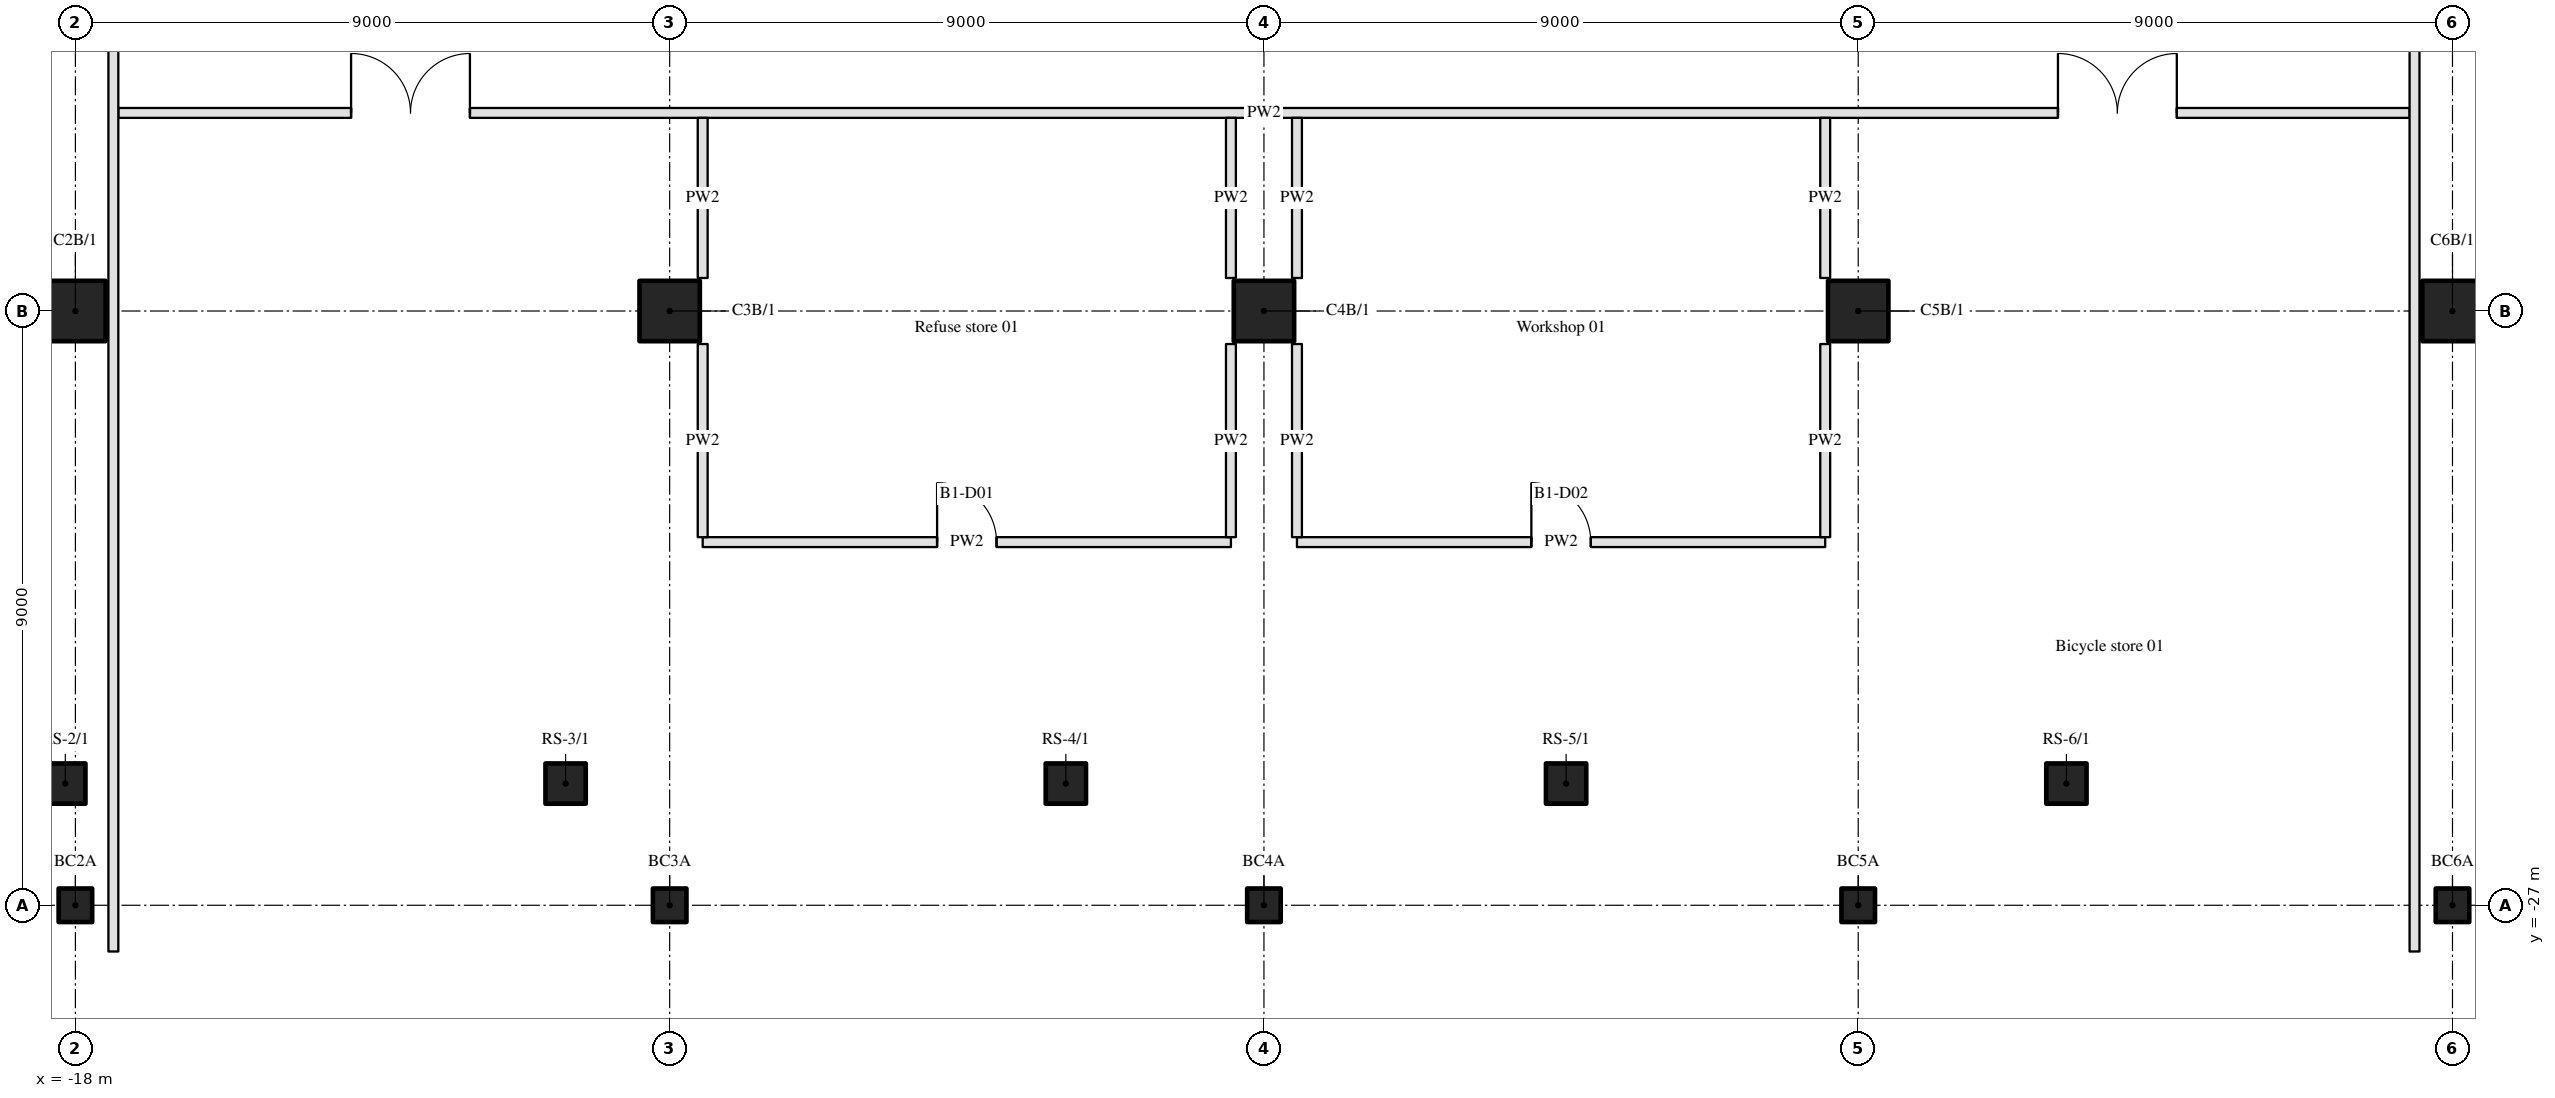
"""IFC4 building model, lengths in metres.
Left out: names, types, materials, properties, quantities, classifications, styles, units other than length and angle.
Written with IfcOpenShell. Run it as: python <this file> out.ifc"""

import sys

from ifc_helpers import new_model, si_unit, direction, frame, frame_2d, origin, origin_2d, place, context, subcontext, project, spatial, rectangle, hollow_circle, extrude, element, fill, save


model = new_model("IFC4")
c1 = context("Model", 3, precision=1e-05, world=origin(), true_north=direction((0.0, 1.0)))
c2 = subcontext(c1, "Body", "Model", "MODEL_VIEW")
j1 = project(units=[si_unit("LENGTHUNIT", "METRE"), si_unit("PLANEANGLEUNIT", "RADIAN")], contexts=[c1])
p1 = place(None, origin())
s1 = spatial("IfcSite", under=j1, at=p1, CompositionType="ELEMENT")
p2 = place(p1, origin())
s2 = spatial("IfcBuilding", under=s1, at=p2, CompositionType="ELEMENT")
p3 = place(p2, frame((0.0, 0.0, -5.0)))
s3 = spatial("IfcBuildingStorey", under=s2, at=p3, CompositionType="ELEMENT", Elevation=-5.0)
for number, where, z_axis, x_axis in (
    (1, (-18.0, -18.0, -0.25), (0.0, 0.0, 1.0), (1.0, 0.0, 0.0)),
    (2, (-9.0, -18.0, -0.25), (0.0, 0.0, 1.0), (1.0, 0.0, 0.0)),
    (3, (0.0, -18.0, -0.25), (0.0, 0.0, 1.0), (1.0, 0.0, 0.0)),
    (4, (9.0, -18.0, -0.25), (0.0, 0.0, 1.0), (1.0, 0.0, 0.0)),
    (5, (18.0, -18.0, -0.25), (0.0, 0.0, 1.0), (1.0, 0.0, 0.0)),
):
    element("IfcColumn", number, at=place(p3, frame(where, z_axis=z_axis, x_axis=x_axis)), inside=s3, PredefinedType="COLUMN", context=c2, shape_type="SweptSolid", body=[
        extrude(hollow_circle(Radius=0.457, WallThickness=0.05, at=origin_2d()), origin(), (0.0, 0.0, 1.0), 5.25),
    ])
for number, where, z_axis, x_axis in (
    (6, (-18.153, -25.157, -0.25), (0.0, 0.0, 1.0), (1.0, 0.0, 0.0)),
    (7, (-10.576, -25.157, -0.25), (0.0, 0.0, 1.0), (1.0, 0.0, 0.0)),
    (8, (-3.0, -25.157, -0.25), (0.0, 0.0, 1.0), (1.0, 0.0, 0.0)),
    (9, (4.576, -25.157, -0.25), (0.0, 0.0, 1.0), (1.0, 0.0, 0.0)),
    (10, (12.153, -25.157, -0.25), (0.0, 0.0, 1.0), (1.0, 0.0, 0.0)),
):
    element("IfcColumn", number, at=place(p3, frame(where, z_axis=z_axis, x_axis=x_axis)), inside=s3, PredefinedType="COLUMN", context=c2, shape_type="SweptSolid", body=[
        extrude(hollow_circle(Radius=0.305, WallThickness=0.03, at=origin_2d()), origin(), (0.0, 0.0, 1.0), 5.25),
    ])
for number, where, z_axis, x_axis in (
    (11, (-18.0, -27.0, -0.25), (0.0, 0.0, 1.0), (1.0, 0.0, 0.0)),
    (12, (-9.0, -27.0, -0.25), (0.0, 0.0, 1.0), (1.0, 0.0, 0.0)),
    (13, (0.0, -27.0, -0.25), (0.0, 0.0, 1.0), (1.0, 0.0, 0.0)),
    (14, (9.0, -27.0, -0.25), (0.0, 0.0, 1.0), (1.0, 0.0, 0.0)),
    (15, (18.0, -27.0, -0.25), (0.0, 0.0, 1.0), (1.0, 0.0, 0.0)),
):
    element("IfcColumn", number, at=place(p3, frame(where, z_axis=z_axis, x_axis=x_axis)), inside=s3, PredefinedType="COLUMN", context=c2, shape_type="SweptSolid", body=[
        extrude(hollow_circle(Radius=0.254, WallThickness=0.03, at=origin_2d()), origin(), (0.0, 0.0, 1.0), 4.8),
    ])
p4 = place(p3, frame((-8.5, -21.5, 0.0), z_axis=(0.0, 0.0, 1.0), x_axis=(1.0, 0.0, 0.0)))
e16 = element("IfcWall", 16, at=p4, inside=s3, PredefinedType="PARTITIONING", context=c2, shape_type="SweptSolid", body=[
    extrude(rectangle(XDim=8.0, YDim=0.15, at=frame_2d((4.0, 0.0))), origin(), (0.0, 0.0, 1.0), 4.06),
])
p5 = place(p4, frame((3.55, 0.0, 0.0)))
e17 = element("IfcOpeningElement", 17, at=p5, cuts=e16, PredefinedType="OPENING", context=c2, shape_type="SweptSolid", body=[
    extrude(rectangle(XDim=0.9, YDim=2.1, at=frame_2d((0.45, 1.05))), frame((0.0, 0.085, 0.0), z_axis=(0.0, -1.0, 0.0), x_axis=(1.0, 0.0, 0.0)), (0.0, 0.0, 1.0), 0.17),
])
p6 = place(p3, frame((0.5, -21.5, 0.0), z_axis=(0.0, 0.0, 1.0), x_axis=(1.0, 0.0, 0.0)))
e18 = element("IfcWall", 18, at=p6, inside=s3, PredefinedType="PARTITIONING", context=c2, shape_type="SweptSolid", body=[
    extrude(rectangle(XDim=8.0, YDim=0.15, at=frame_2d((4.0, 0.0))), origin(), (0.0, 0.0, 1.0), 4.06),
])
p7 = place(p6, frame((3.55, 0.0, 0.0)))
e19 = element("IfcOpeningElement", 19, at=p7, cuts=e18, PredefinedType="OPENING", context=c2, shape_type="SweptSolid", body=[
    extrude(rectangle(XDim=0.9, YDim=2.1, at=frame_2d((0.45, 1.05))), frame((0.0, 0.085, 0.0), z_axis=(0.0, -1.0, 0.0), x_axis=(1.0, 0.0, 0.0)), (0.0, 0.0, 1.0), 0.17),
])
p8 = place(p3, frame((-17.35, -15.0, 0.0), z_axis=(0.0, 0.0, 1.0), x_axis=(1.0, 0.0, 0.0)))
e20 = element("IfcWall", 20, at=p8, inside=s3, PredefinedType="PARTITIONING", context=c2, shape_type="SweptSolid", body=[
    extrude(rectangle(XDim=34.7, YDim=0.15, at=frame_2d((17.35, 0.0))), origin(), (0.0, 0.0, 1.0), 4.06),
])
p9 = place(p8, frame((3.525, 0.0, 0.0)))
e21 = element("IfcOpeningElement", 21, at=p9, cuts=e20, PredefinedType="OPENING", context=c2, shape_type="SweptSolid", body=[
    extrude(rectangle(XDim=1.8, YDim=2.1, at=frame_2d((0.9, 1.05))), frame((0.0, 0.085, 0.0), z_axis=(0.0, -1.0, 0.0), x_axis=(1.0, 0.0, 0.0)), (0.0, 0.0, 1.0), 0.17),
])
p10 = place(p8, frame((29.375, 0.0, 0.0)))
e22 = element("IfcOpeningElement", 22, at=p10, cuts=e20, PredefinedType="OPENING", context=c2, shape_type="SweptSolid", body=[
    extrude(rectangle(XDim=1.8, YDim=2.1, at=frame_2d((0.9, 1.05))), frame((0.0, 0.085, 0.0), z_axis=(0.0, -1.0, 0.0), x_axis=(1.0, 0.0, 0.0)), (0.0, 0.0, 1.0), 0.17),
])
p11 = place(p3, frame((-17.425, 27.7, 0.0), z_axis=(0.0, 0.0, 1.0), x_axis=(0.0, -1.0, 0.0)))
e23 = element("IfcWall", 23, at=p11, inside=s3, PredefinedType="PARTITIONING", context=c2, shape_type="SweptSolid", body=[
    extrude(rectangle(XDim=55.4, YDim=0.15, at=frame_2d((27.7, 0.0))), origin(), (0.0, 0.0, 1.0), 4.06),
])
p12 = place(p11, frame((38.8, 0.0, 0.0)))
e24 = element("IfcOpeningElement", 24, at=p12, cuts=e23, PredefinedType="OPENING", context=c2, shape_type="SweptSolid", body=[
    extrude(rectangle(XDim=1.8, YDim=2.1, at=frame_2d((0.9, 1.05))), frame((0.0, 0.085, 0.0), z_axis=(0.0, -1.0, 0.0), x_axis=(1.0, 0.0, 0.0)), (0.0, 0.0, 1.0), 0.17),
])
p13 = place(p11, frame((28.3, 0.0, 0.0)))
e25 = element("IfcOpeningElement", 25, at=p13, cuts=e23, PredefinedType="OPENING", context=c2, shape_type="SweptSolid", body=[
    extrude(rectangle(XDim=1.8, YDim=2.1, at=frame_2d((0.9, 1.05))), frame((0.0, 0.085, 0.0), z_axis=(0.0, -1.0, 0.0), x_axis=(1.0, 0.0, 0.0)), (0.0, 0.0, 1.0), 0.17),
])
p14 = place(p11, frame((30.4, 0.0, 0.0)))
e26 = element("IfcOpeningElement", 26, at=p14, cuts=e23, PredefinedType="OPENING", context=c2, shape_type="SweptSolid", body=[
    extrude(rectangle(XDim=1.8, YDim=2.1, at=frame_2d((0.9, 1.05))), frame((0.0, 0.085, 0.0), z_axis=(0.0, -1.0, 0.0), x_axis=(1.0, 0.0, 0.0)), (0.0, 0.0, 1.0), 0.17),
])
p15 = place(p3, frame((-8.5, -21.425, 0.0), z_axis=(0.0, 0.0, 1.0), x_axis=(0.0, 1.0, 0.0)))
e27 = element("IfcWall", 27, at=p15, inside=s3, PredefinedType="PARTITIONING", context=c2, shape_type="SweptSolid", body=[
    extrude(rectangle(XDim=2.925, YDim=0.15, at=frame_2d((1.462, 0.0))), origin(), (0.0, 0.0, 1.0), 4.06),
])
p16 = place(p3, frame((-8.5, -17.5, 0.0), z_axis=(0.0, 0.0, 1.0), x_axis=(0.0, 1.0, 0.0)))
e28 = element("IfcWall", 28, at=p16, inside=s3, PredefinedType="PARTITIONING", context=c2, shape_type="SweptSolid", body=[
    extrude(rectangle(XDim=2.425, YDim=0.15, at=frame_2d((1.212, 0.0))), origin(), (0.0, 0.0, 1.0), 4.06),
])
p17 = place(p3, frame((-0.5, -21.425, 0.0), z_axis=(0.0, 0.0, 1.0), x_axis=(0.0, 1.0, 0.0)))
e29 = element("IfcWall", 29, at=p17, inside=s3, PredefinedType="PARTITIONING", context=c2, shape_type="SweptSolid", body=[
    extrude(rectangle(XDim=2.925, YDim=0.15, at=frame_2d((1.462, 0.0))), origin(), (0.0, 0.0, 1.0), 4.06),
])
p18 = place(p3, frame((-0.5, -17.5, 0.0), z_axis=(0.0, 0.0, 1.0), x_axis=(0.0, 1.0, 0.0)))
e30 = element("IfcWall", 30, at=p18, inside=s3, PredefinedType="PARTITIONING", context=c2, shape_type="SweptSolid", body=[
    extrude(rectangle(XDim=2.425, YDim=0.15, at=frame_2d((1.212, 0.0))), origin(), (0.0, 0.0, 1.0), 4.06),
])
p19 = place(p3, frame((0.5, -21.425, 0.0), z_axis=(0.0, 0.0, 1.0), x_axis=(0.0, 1.0, 0.0)))
e31 = element("IfcWall", 31, at=p19, inside=s3, PredefinedType="PARTITIONING", context=c2, shape_type="SweptSolid", body=[
    extrude(rectangle(XDim=2.925, YDim=0.15, at=frame_2d((1.462, 0.0))), origin(), (0.0, 0.0, 1.0), 4.06),
])
p20 = place(p3, frame((0.5, -17.5, 0.0), z_axis=(0.0, 0.0, 1.0), x_axis=(0.0, 1.0, 0.0)))
e32 = element("IfcWall", 32, at=p20, inside=s3, PredefinedType="PARTITIONING", context=c2, shape_type="SweptSolid", body=[
    extrude(rectangle(XDim=2.425, YDim=0.15, at=frame_2d((1.212, 0.0))), origin(), (0.0, 0.0, 1.0), 4.06),
])
p21 = place(p3, frame((8.5, -21.425, 0.0), z_axis=(0.0, 0.0, 1.0), x_axis=(0.0, 1.0, 0.0)))
e33 = element("IfcWall", 33, at=p21, inside=s3, PredefinedType="PARTITIONING", context=c2, shape_type="SweptSolid", body=[
    extrude(rectangle(XDim=2.925, YDim=0.15, at=frame_2d((1.462, 0.0))), origin(), (0.0, 0.0, 1.0), 4.06),
])
p22 = place(p3, frame((8.5, -17.5, 0.0), z_axis=(0.0, 0.0, 1.0), x_axis=(0.0, 1.0, 0.0)))
e34 = element("IfcWall", 34, at=p22, inside=s3, PredefinedType="PARTITIONING", context=c2, shape_type="SweptSolid", body=[
    extrude(rectangle(XDim=2.425, YDim=0.15, at=frame_2d((1.212, 0.0))), origin(), (0.0, 0.0, 1.0), 4.06),
])
p23 = place(p3, frame((17.425, -27.7, 0.0), z_axis=(0.0, 0.0, 1.0), x_axis=(0.0, 1.0, 0.0)))
e35 = element("IfcWall", 35, at=p23, inside=s3, PredefinedType="PARTITIONING", context=c2, shape_type="SweptSolid", body=[
    extrude(rectangle(XDim=55.4, YDim=0.15, at=frame_2d((27.7, 0.0))), origin(), (0.0, 0.0, 1.0), 4.06),
])
p24 = place(p23, frame((19.3, 0.0, 0.0)))
e36 = element("IfcOpeningElement", 36, at=p24, cuts=e35, PredefinedType="OPENING", context=c2, shape_type="SweptSolid", body=[
    extrude(rectangle(XDim=1.8, YDim=2.1, at=frame_2d((0.9, 1.05))), frame((0.0, 0.085, 0.0), z_axis=(0.0, -1.0, 0.0), x_axis=(1.0, 0.0, 0.0)), (0.0, 0.0, 1.0), 0.17),
])
p25 = place(p23, frame((21.4, 0.0, 0.0)))
e37 = element("IfcOpeningElement", 37, at=p25, cuts=e35, PredefinedType="OPENING", context=c2, shape_type="SweptSolid", body=[
    extrude(rectangle(XDim=1.8, YDim=2.1, at=frame_2d((0.9, 1.05))), frame((0.0, 0.085, 0.0), z_axis=(0.0, -1.0, 0.0), x_axis=(1.0, 0.0, 0.0)), (0.0, 0.0, 1.0), 0.17),
])
p26 = place(p23, frame((29.8, 0.0, 0.0)))
e38 = element("IfcOpeningElement", 38, at=p26, cuts=e35, PredefinedType="OPENING", context=c2, shape_type="SweptSolid", body=[
    extrude(rectangle(XDim=1.8, YDim=2.1, at=frame_2d((0.9, 1.05))), frame((0.0, 0.085, 0.0), z_axis=(0.0, -1.0, 0.0), x_axis=(1.0, 0.0, 0.0)), (0.0, 0.0, 1.0), 0.17),
])
p27 = place(p9, origin())
e39 = element("IfcDoor", 39, at=p27, inside=s3, OperationType="DOUBLE_DOOR_SINGLE_SWING", PredefinedType="DOOR", context=c2, shape_type="SweptSolid", body=[
    extrude(rectangle(XDim=1.8, YDim=2.1, at=frame_2d((0.9, 1.05))), frame((0.0, 0.025, 0.0), z_axis=(0.0, -1.0, 0.0), x_axis=(1.0, 0.0, 0.0)), (0.0, 0.0, 1.0), 0.05),
])
fill(e21, e39)
p28 = place(p10, origin())
e40 = element("IfcDoor", 40, at=p28, inside=s3, OperationType="DOUBLE_DOOR_SINGLE_SWING", PredefinedType="DOOR", context=c2, shape_type="SweptSolid", body=[
    extrude(rectangle(XDim=1.8, YDim=2.1, at=frame_2d((0.9, 1.05))), frame((0.0, 0.025, 0.0), z_axis=(0.0, -1.0, 0.0), x_axis=(1.0, 0.0, 0.0)), (0.0, 0.0, 1.0), 0.05),
])
fill(e22, e40)
p29 = place(p7, origin())
e41 = element("IfcDoor", 41, at=p29, inside=s3, OperationType="SINGLE_SWING_LEFT", PredefinedType="DOOR", context=c2, shape_type="SweptSolid", body=[
    extrude(rectangle(XDim=0.9, YDim=2.1, at=frame_2d((0.45, 1.05))), frame((0.0, 0.025, 0.0), z_axis=(0.0, -1.0, 0.0), x_axis=(1.0, 0.0, 0.0)), (0.0, 0.0, 1.0), 0.05),
])
fill(e19, e41)
p30 = place(p5, origin())
e42 = element("IfcDoor", 42, at=p30, inside=s3, OperationType="SINGLE_SWING_LEFT", PredefinedType="DOOR", context=c2, shape_type="SweptSolid", body=[
    extrude(rectangle(XDim=0.9, YDim=2.1, at=frame_2d((0.45, 1.05))), frame((0.0, 0.025, 0.0), z_axis=(0.0, -1.0, 0.0), x_axis=(1.0, 0.0, 0.0)), (0.0, 0.0, 1.0), 0.05),
])
fill(e17, e42)
save(model, sys.argv[1])
